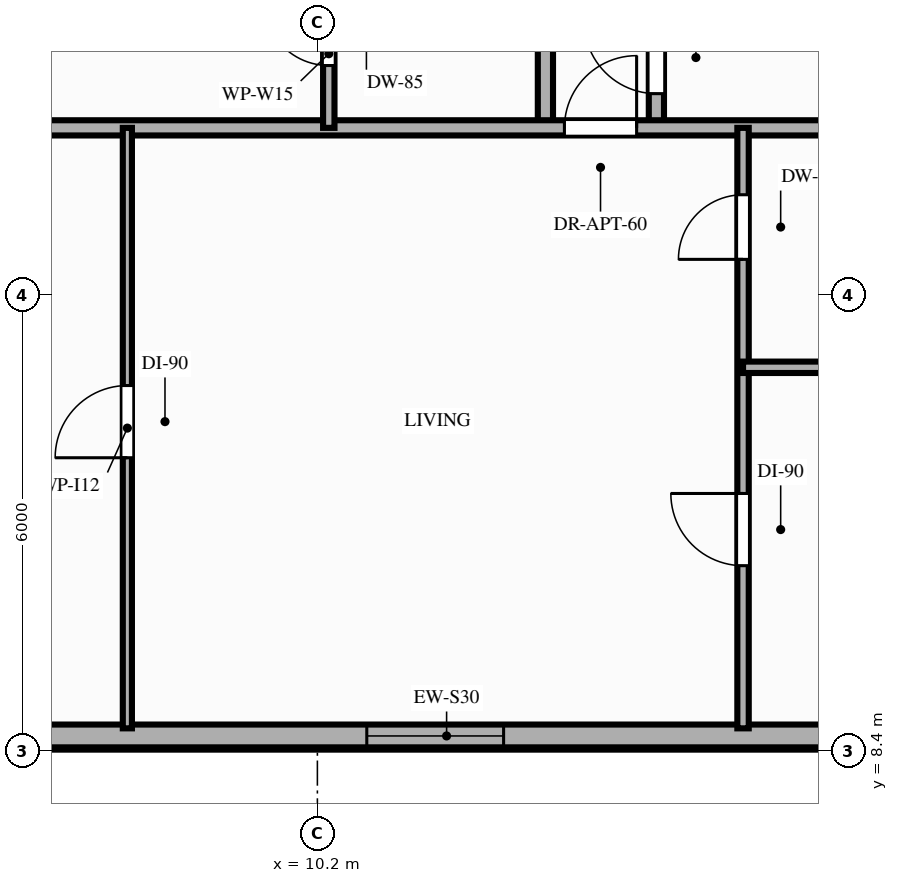
"""IFC4 building model, lengths in metres.
Left out: names, types, materials, properties, quantities, classifications, styles, units other than length and angle.
Written with IfcOpenShell. Run it as: python <this file> out.ifc"""

import sys

from ifc_helpers import new_model, si_unit, direction, frame, frame_2d, origin, place, context, subcontext, project, spatial, rectangle, extrude, element, fill, save


model = new_model("IFC4")
c1 = context("Model", 3, precision=1e-05, world=origin(), true_north=direction((0.0, 1.0)))
c2 = subcontext(c1, "Body", "Model", "MODEL_VIEW")
j1 = project(units=[si_unit("LENGTHUNIT", "METRE"), si_unit("PLANEANGLEUNIT", "RADIAN")], contexts=[c1])
p1 = place(None, origin())
s1 = spatial("IfcSite", under=j1, at=p1, CompositionType="ELEMENT")
p2 = place(p1, origin())
s2 = spatial("IfcBuilding", under=s1, at=p2, CompositionType="ELEMENT")
p3 = place(p2, frame((0.0, 0.0, 123.4)))
s3 = spatial("IfcBuildingStorey", under=s2, at=p3, CompositionType="ELEMENT", Elevation=123.4)
p4 = place(p3, frame((4.0, 8.6, 0.0), z_axis=(0.0, 0.0, 1.0), x_axis=(1.0, 0.0, 0.0)))
e1 = element("IfcWall", 1, at=p4, inside=s3, PredefinedType="STANDARD", context=c2, shape_type="SweptSolid", body=[
    extrude(rectangle(XDim=15.8, YDim=0.3, at=frame_2d((7.9, 0.0))), origin(), (0.0, 0.0, 1.0), 3.02),
])
p5 = place(p4, frame((6.85, 0.0, 0.85)))
e2 = element("IfcOpeningElement", 2, at=p5, cuts=e1, PredefinedType="OPENING", context=c2, shape_type="SweptSolid", body=[
    extrude(rectangle(XDim=1.8, YDim=1.75, at=frame_2d((0.9, 0.875))), frame((0.0, 0.16, 0.0), z_axis=(0.0, -1.0, 0.0), x_axis=(1.0, 0.0, 0.0)), (0.0, 0.0, 1.0), 0.32),
])
p6 = place(p3, frame((13.2, 16.6, 0.0), z_axis=(0.0, 0.0, 1.0), x_axis=(0.0, 1.0, 0.0)))
e3 = element("IfcWall", 3, at=p6, inside=s3, PredefinedType="PARTITIONING", context=c2, shape_type="SweptSolid", body=[
    extrude(rectangle(XDim=11.5, YDim=0.2, at=frame_2d((5.75, 0.0))), origin(), (0.0, 0.0, 1.0), 2.45),
])
p7 = place(p6, frame((2.33, 0.0, 0.0)))
e4 = element("IfcOpeningElement", 4, at=p7, cuts=e3, PredefinedType="OPENING", context=c2, shape_type="SweptSolid", body=[
    extrude(rectangle(XDim=0.95, YDim=2.15, at=frame_2d((0.475, 1.075))), frame((0.0, 0.11, 0.0), z_axis=(0.0, -1.0, 0.0), x_axis=(1.0, 0.0, 0.0)), (0.0, 0.0, 1.0), 0.22),
])
p8 = place(p6, frame((6.54, 0.0, 0.0)))
e5 = element("IfcOpeningElement", 5, at=p8, cuts=e3, PredefinedType="OPENING", context=c2, shape_type="SweptSolid", body=[
    extrude(rectangle(XDim=0.95, YDim=2.15, at=frame_2d((0.475, 1.075))), frame((0.0, 0.11, 0.0), z_axis=(0.0, -1.0, 0.0), x_axis=(1.0, 0.0, 0.0)), (0.0, 0.0, 1.0), 0.22),
])
p9 = place(p6, frame((10.31, 0.0, 0.0)))
e6 = element("IfcOpeningElement", 6, at=p9, cuts=e3, PredefinedType="OPENING", context=c2, shape_type="SweptSolid", body=[
    extrude(rectangle(XDim=0.95, YDim=2.15, at=frame_2d((0.475, 1.075))), frame((0.0, 0.11, 0.0), z_axis=(0.0, -1.0, 0.0), x_axis=(1.0, 0.0, 0.0)), (0.0, 0.0, 1.0), 0.22),
])
p10 = place(p3, frame((14.66, 16.6, 0.0), z_axis=(0.0, 0.0, 1.0), x_axis=(0.0, 1.0, 0.0)))
e7 = element("IfcWall", 7, at=p10, inside=s3, PredefinedType="PARTITIONING", context=c2, shape_type="SweptSolid", body=[
    extrude(rectangle(XDim=11.5, YDim=0.2, at=frame_2d((5.75, 0.0))), origin(), (0.0, 0.0, 1.0), 2.45),
])
p11 = place(p10, frame((0.45, 0.0, 0.0)))
e8 = element("IfcOpeningElement", 8, at=p11, cuts=e7, PredefinedType="OPENING", context=c2, shape_type="SweptSolid", body=[
    extrude(rectangle(XDim=0.95, YDim=2.15, at=frame_2d((0.475, 1.075))), frame((0.0, 0.11, 0.0), z_axis=(0.0, -1.0, 0.0), x_axis=(1.0, 0.0, 0.0)), (0.0, 0.0, 1.0), 0.22),
])
p12 = place(p10, frame((2.75, 0.0, 0.0)))
e9 = element("IfcOpeningElement", 9, at=p12, cuts=e7, PredefinedType="OPENING", context=c2, shape_type="SweptSolid", body=[
    extrude(rectangle(XDim=0.95, YDim=2.1, at=frame_2d((0.475, 1.05))), frame((0.0, 0.11, 0.0), z_axis=(0.0, -1.0, 0.0), x_axis=(1.0, 0.0, 0.0)), (0.0, 0.0, 1.0), 0.22),
])
p13 = place(p10, frame((7.52, 0.0, 0.0)))
e10 = element("IfcOpeningElement", 10, at=p13, cuts=e7, PredefinedType="OPENING", context=c2, shape_type="SweptSolid", body=[
    extrude(rectangle(XDim=1.0, YDim=2.15, at=frame_2d((0.5, 1.075))), frame((0.0, 0.11, 0.0), z_axis=(0.0, -1.0, 0.0), x_axis=(1.0, 0.0, 0.0)), (0.0, 0.0, 1.0), 0.22),
])
p14 = place(p3, frame((3.9, 16.6, 0.0), z_axis=(0.0, 0.0, 1.0), x_axis=(1.0, 0.0, 0.0)))
e11 = element("IfcWall", 11, at=p14, inside=s3, PredefinedType="PARTITIONING", context=c2, shape_type="SweptSolid", body=[
    extrude(rectangle(XDim=16.0, YDim=0.2, at=frame_2d((8.0, 0.0))), origin(), (0.0, 0.0, 1.0), 2.45),
])
p15 = place(p14, frame((9.55, 0.0, 0.0)))
e12 = element("IfcOpeningElement", 12, at=p15, cuts=e11, PredefinedType="OPENING", context=c2, shape_type="SweptSolid", body=[
    extrude(rectangle(XDim=0.95, YDim=2.15, at=frame_2d((0.475, 1.075))), frame((0.0, 0.11, 0.0), z_axis=(0.0, -1.0, 0.0), x_axis=(1.0, 0.0, 0.0)), (0.0, 0.0, 1.0), 0.22),
])
p16 = place(p3, frame((10.35, 16.6, 0.0), z_axis=(0.0, 0.0, 1.0), x_axis=(0.0, 1.0, 0.0)))
e13 = element("IfcWall", 13, at=p16, inside=s3, PredefinedType="PARTITIONING", context=c2, shape_type="SweptSolid", body=[
    extrude(rectangle(XDim=1.95, YDim=0.15, at=frame_2d((0.975, 0.0))), origin(), (0.0, 0.0, 1.0), 2.45),
])
p17 = place(p16, frame((0.82, 0.0, 0.0)))
e14 = element("IfcOpeningElement", 14, at=p17, cuts=e13, PredefinedType="OPENING", context=c2, shape_type="SweptSolid", body=[
    extrude(rectangle(XDim=0.85, YDim=2.1, at=frame_2d((0.425, 1.05))), frame((0.0, 0.085, 0.0), z_axis=(0.0, -1.0, 0.0), x_axis=(1.0, 0.0, 0.0)), (0.0, 0.0, 1.0), 0.17),
])
p18 = place(p3, frame((7.7, 8.7, 0.0), z_axis=(0.0, 0.0, 1.0), x_axis=(0.0, 1.0, 0.0)))
e15 = element("IfcWall", 15, at=p18, inside=s3, PredefinedType="PARTITIONING", context=c2, shape_type="SweptSolid", body=[
    extrude(rectangle(XDim=7.9, YDim=0.12, at=frame_2d((3.95, 0.0))), origin(), (0.0, 0.0, 1.0), 2.45),
])
p19 = place(p18, frame((3.56, 0.0, 0.0)))
e16 = element("IfcOpeningElement", 16, at=p19, cuts=e15, PredefinedType="OPENING", context=c2, shape_type="SweptSolid", body=[
    extrude(rectangle(XDim=0.95, YDim=2.15, at=frame_2d((0.475, 1.075))), frame((0.0, 0.07, 0.0), z_axis=(0.0, -1.0, 0.0), x_axis=(1.0, 0.0, 0.0)), (0.0, 0.0, 1.0), 0.14),
])
p20 = place(p3, frame((15.8, 8.7, 0.0), z_axis=(0.0, 0.0, 1.0), x_axis=(0.0, 1.0, 0.0)))
e17 = element("IfcWall", 17, at=p20, inside=s3, PredefinedType="PARTITIONING", context=c2, shape_type="SweptSolid", body=[
    extrude(rectangle(XDim=7.9, YDim=0.15, at=frame_2d((3.95, 0.0))), origin(), (0.0, 0.0, 1.0), 2.45),
])
p21 = place(p20, frame((2.14, 0.0, 0.0)))
e18 = element("IfcOpeningElement", 18, at=p21, cuts=e17, PredefinedType="OPENING", context=c2, shape_type="SweptSolid", body=[
    extrude(rectangle(XDim=0.95, YDim=2.15, at=frame_2d((0.475, 1.075))), frame((0.0, 0.085, 0.0), z_axis=(0.0, -1.0, 0.0), x_axis=(1.0, 0.0, 0.0)), (0.0, 0.0, 1.0), 0.17),
])
p22 = place(p20, frame((6.17, 0.0, 0.0)))
e19 = element("IfcOpeningElement", 19, at=p22, cuts=e17, PredefinedType="OPENING", context=c2, shape_type="SweptSolid", body=[
    extrude(rectangle(XDim=0.85, YDim=2.1, at=frame_2d((0.425, 1.05))), frame((0.0, 0.085, 0.0), z_axis=(0.0, -1.0, 0.0), x_axis=(1.0, 0.0, 0.0)), (0.0, 0.0, 1.0), 0.17),
])
p23 = place(p3, frame((15.8, 13.45, 0.0), z_axis=(0.0, 0.0, 1.0), x_axis=(1.0, 0.0, 0.0)))
e20 = element("IfcWall", 20, at=p23, inside=s3, PredefinedType="PARTITIONING", context=c2, shape_type="SweptSolid", body=[
    extrude(rectangle(XDim=4.1, YDim=0.15, at=frame_2d((2.05, 0.0))), origin(), (0.0, 0.0, 1.0), 2.45),
])
p24 = place(p5, origin())
e21 = element("IfcWindow", 21, at=p24, inside=s3, PartitioningType="SINGLE_PANEL", PredefinedType="WINDOW", context=c2, shape_type="SweptSolid", body=[
    extrude(rectangle(XDim=1.8, YDim=1.75, at=frame_2d((0.9, 0.875))), frame((0.0, 0.03, 0.0), z_axis=(0.0, -1.0, 0.0), x_axis=(1.0, 0.0, 0.0)), (0.0, 0.0, 1.0), 0.06),
])
fill(e2, e21)
p25 = place(p17, origin())
e22 = element("IfcDoor", 22, at=p25, inside=s3, OperationType="SINGLE_SWING_RIGHT", PredefinedType="DOOR", context=c2, shape_type="SweptSolid", body=[
    extrude(rectangle(XDim=0.85, YDim=2.1, at=frame_2d((0.425, 1.05))), frame((0.0, 0.025, 0.0), z_axis=(0.0, -1.0, 0.0), x_axis=(1.0, 0.0, 0.0)), (0.0, 0.0, 1.0), 0.05),
])
fill(e14, e22)
p26 = place(p15, origin())
e23 = element("IfcDoor", 23, at=p26, inside=s3, OperationType="SINGLE_SWING_RIGHT", PredefinedType="DOOR", context=c2, shape_type="SweptSolid", body=[
    extrude(rectangle(XDim=0.95, YDim=2.15, at=frame_2d((0.475, 1.075))), frame((0.0, 0.025, 0.0), z_axis=(0.0, -1.0, 0.0), x_axis=(1.0, 0.0, 0.0)), (0.0, 0.0, 1.0), 0.05),
])
fill(e12, e23)
p27 = place(p19, origin())
e24 = element("IfcDoor", 24, at=p27, inside=s3, OperationType="SINGLE_SWING_LEFT", PredefinedType="DOOR", context=c2, shape_type="SweptSolid", body=[
    extrude(rectangle(XDim=0.95, YDim=2.15, at=frame_2d((0.475, 1.075))), frame((0.0, 0.025, 0.0), z_axis=(0.0, -1.0, 0.0), x_axis=(1.0, 0.0, 0.0)), (0.0, 0.0, 1.0), 0.05),
])
fill(e16, e24)
p28 = place(p21, origin())
e25 = element("IfcDoor", 25, at=p28, inside=s3, OperationType="SINGLE_SWING_RIGHT", PredefinedType="DOOR", context=c2, shape_type="SweptSolid", body=[
    extrude(rectangle(XDim=0.95, YDim=2.15, at=frame_2d((0.475, 1.075))), frame((0.0, 0.025, 0.0), z_axis=(0.0, -1.0, 0.0), x_axis=(1.0, 0.0, 0.0)), (0.0, 0.0, 1.0), 0.05),
])
fill(e18, e25)
p29 = place(p22, origin())
e26 = element("IfcDoor", 26, at=p29, inside=s3, OperationType="SINGLE_SWING_LEFT", PredefinedType="DOOR", context=c2, shape_type="SweptSolid", body=[
    extrude(rectangle(XDim=0.85, YDim=2.1, at=frame_2d((0.425, 1.05))), frame((0.0, 0.025, 0.0), z_axis=(0.0, -1.0, 0.0), x_axis=(1.0, 0.0, 0.0)), (0.0, 0.0, 1.0), 0.05),
])
fill(e19, e26)
p30 = place(p11, origin())
e27 = element("IfcDoor", 27, at=p30, inside=s3, OperationType="SINGLE_SWING_RIGHT", PredefinedType="DOOR", context=c2, shape_type="SweptSolid", body=[
    extrude(rectangle(XDim=0.95, YDim=2.15, at=frame_2d((0.475, 1.075))), frame((0.0, 0.025, 0.0), z_axis=(0.0, -1.0, 0.0), x_axis=(1.0, 0.0, 0.0)), (0.0, 0.0, 1.0), 0.05),
])
fill(e8, e27)
save(model, sys.argv[1])
